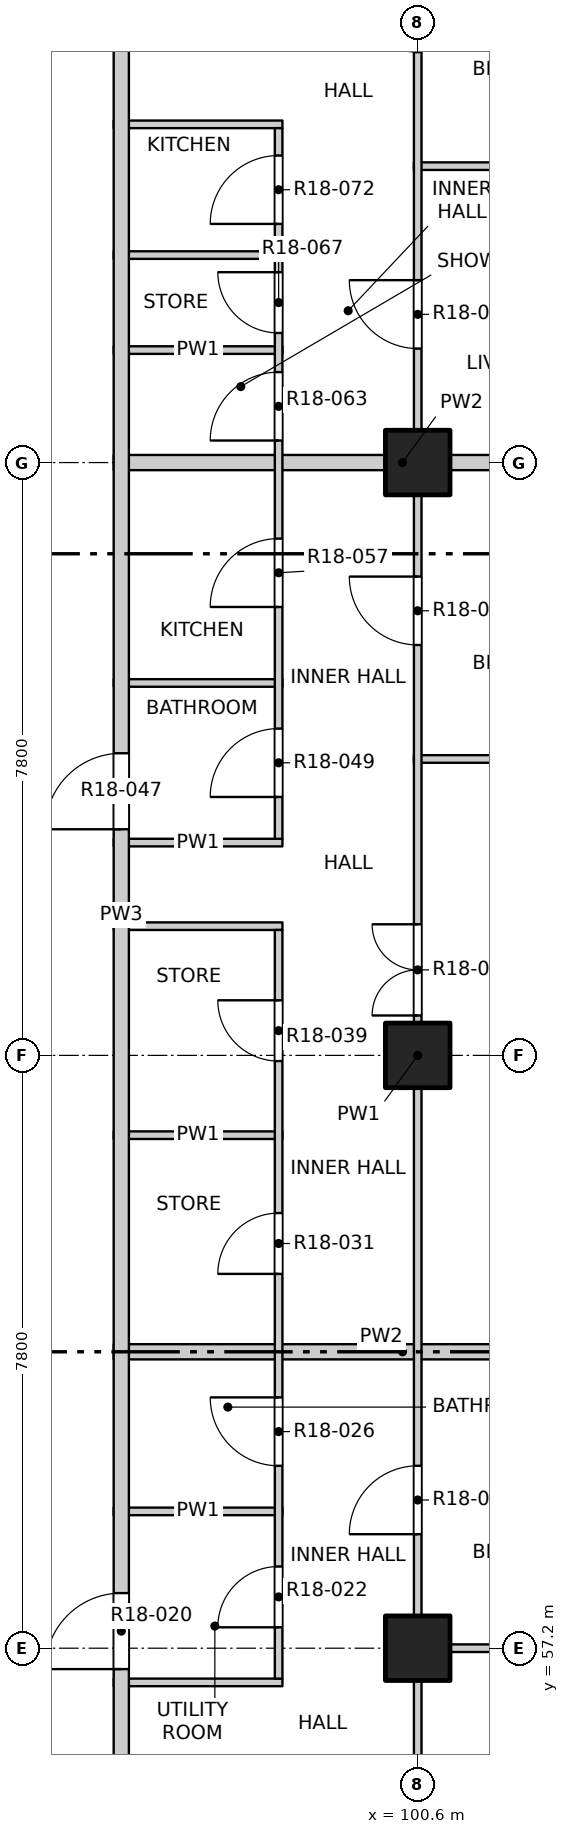
"""IFC4 building model, lengths in metres.
Left out: names, types, materials, properties, quantities, classifications, styles, units other than length and angle.
Written with IfcOpenShell. Run it as: python <this file> out.ifc"""

import sys

from ifc_helpers import new_model, si_unit, direction, frame, frame_2d, origin, origin_2d, place, context, subcontext, project, spatial, rectangle, extrude, element, fill, save


model = new_model("IFC4")
c1 = context("Model", 3, precision=1e-05, world=origin(), true_north=direction((0.0, 1.0)))
c2 = subcontext(c1, "Body", "Model", "MODEL_VIEW")
j1 = project(units=[si_unit("LENGTHUNIT", "METRE"), si_unit("PLANEANGLEUNIT", "RADIAN")], contexts=[c1])
p1 = place(None, origin())
s1 = spatial("IfcSite", under=j1, at=p1, CompositionType="ELEMENT")
p2 = place(p1, origin())
s2 = spatial("IfcBuilding", under=s1, at=p2, CompositionType="ELEMENT")
p3 = place(p2, frame((0.0, 0.0, 189.4)))
s3 = spatial("IfcBuildingStorey", under=s2, at=p3, CompositionType="ELEMENT", Elevation=189.4)
for number, where, z_axis, x_axis in (
    (1, (100.6, 57.2, -0.25), (0.0, 0.0, 1.0), (1.0, 0.0, 0.0)),
    (2, (100.6, 65.0, -0.25), (0.0, 0.0, 1.0), (1.0, 0.0, 0.0)),
    (3, (100.6, 72.8, -0.25), (0.0, 0.0, 1.0), (1.0, 0.0, 0.0)),
):
    element("IfcColumn", number, at=place(p3, frame(where, z_axis=z_axis, x_axis=x_axis)), inside=s3, PredefinedType="COLUMN", context=c2, shape_type="SweptSolid", body=[
        extrude(rectangle(XDim=0.85, YDim=0.85, at=origin_2d()), origin(), (0.0, 0.0, 1.0), 3.35),
    ])
p4 = place(p3, frame((96.6, 56.75, 0.0), z_axis=(0.0, 0.0, 1.0), x_axis=(1.0, 0.0, 0.0)))
e4 = element("IfcWall", 4, at=p4, inside=s3, PredefinedType="PARTITIONING", context=c2, shape_type="SweptSolid", body=[
    extrude(rectangle(XDim=2.22, YDim=0.1, at=frame_2d((1.11, 0.0))), origin(), (0.0, 0.0, 1.0), 3.1),
])
p5 = place(p3, frame((100.55, 57.2, 0.0), z_axis=(0.0, 0.0, 1.0), x_axis=(1.0, 0.0, 0.0)))
e5 = element("IfcWall", 5, at=p5, inside=s3, PredefinedType="PARTITIONING", context=c2, shape_type="SweptSolid", body=[
    extrude(rectangle(XDim=3.65, YDim=0.1, at=frame_2d((1.825, 0.0))), origin(), (0.0, 0.0, 1.0), 3.1),
])
p6 = place(p3, frame((96.6, 59.0, 0.0), z_axis=(0.0, 0.0, 1.0), x_axis=(1.0, 0.0, 0.0)))
e6 = element("IfcWall", 6, at=p6, inside=s3, PredefinedType="PARTITIONING", context=c2, shape_type="SweptSolid", body=[
    extrude(rectangle(XDim=2.22, YDim=0.1, at=frame_2d((1.11, 0.0))), origin(), (0.0, 0.0, 1.0), 3.1),
])
p7 = place(p3, frame((96.6, 61.1, 0.0), z_axis=(0.0, 0.0, 1.0), x_axis=(1.0, 0.0, 0.0)))
e7 = element("IfcWall", 7, at=p7, inside=s3, PredefinedType="PARTITIONING", context=c2, shape_type="SweptSolid", body=[
    extrude(rectangle(XDim=7.6, YDim=0.2, at=frame_2d((3.8, 0.0))), origin(), (0.0, 0.0, 1.0), 3.1),
])
for number, where, z_axis, x_axis in (
    (8, (96.6, 63.95, 0.0), (0.0, 0.0, 1.0), (1.0, 0.0, 0.0)),
    (9, (96.6, 66.7, 0.0), (0.0, 0.0, 1.0), (1.0, 0.0, 0.0)),
    (10, (96.6, 67.8, 0.0), (0.0, 0.0, 1.0), (1.0, 0.0, 0.0)),
):
    element("IfcWall", number, at=place(p3, frame(where, z_axis=z_axis, x_axis=x_axis)), inside=s3, PredefinedType="PARTITIONING", context=c2, shape_type="SweptSolid", body=[
        extrude(rectangle(XDim=2.22, YDim=0.1, at=frame_2d((1.11, 0.0))), origin(), (0.0, 0.0, 1.0), 3.1),
    ])
p8 = place(p3, frame((100.55, 68.9, 0.0), z_axis=(0.0, 0.0, 1.0), x_axis=(1.0, 0.0, 0.0)))
e11 = element("IfcWall", 11, at=p8, inside=s3, PredefinedType="PARTITIONING", context=c2, shape_type="SweptSolid", body=[
    extrude(rectangle(XDim=3.65, YDim=0.1, at=frame_2d((1.825, 0.0))), origin(), (0.0, 0.0, 1.0), 3.1),
])
p9 = place(p3, frame((96.6, 69.9, 0.0), z_axis=(0.0, 0.0, 1.0), x_axis=(1.0, 0.0, 0.0)))
e12 = element("IfcWall", 12, at=p9, inside=s3, PredefinedType="PARTITIONING", context=c2, shape_type="SweptSolid", body=[
    extrude(rectangle(XDim=2.22, YDim=0.1, at=frame_2d((1.11, 0.0))), origin(), (0.0, 0.0, 1.0), 3.1),
])
p10 = place(p3, frame((96.6, 72.8, 0.0), z_axis=(0.0, 0.0, 1.0), x_axis=(1.0, 0.0, 0.0)))
e13 = element("IfcWall", 13, at=p10, inside=s3, PredefinedType="PARTITIONING", context=c2, shape_type="SweptSolid", body=[
    extrude(rectangle(XDim=7.6, YDim=0.2, at=frame_2d((3.8, 0.0))), origin(), (0.0, 0.0, 1.0), 3.1),
])
for number, where, z_axis, x_axis in (
    (14, (96.6, 74.28, 0.0), (0.0, 0.0, 1.0), (1.0, 0.0, 0.0)),
    (15, (96.6, 75.53, 0.0), (0.0, 0.0, 1.0), (1.0, 0.0, 0.0)),
):
    element("IfcWall", number, at=place(p3, frame(where, z_axis=z_axis, x_axis=x_axis)), inside=s3, PredefinedType="PARTITIONING", context=c2, shape_type="SweptSolid", body=[
        extrude(rectangle(XDim=2.22, YDim=0.1, at=frame_2d((1.11, 0.0))), origin(), (0.0, 0.0, 1.0), 3.1),
    ])
p11 = place(p3, frame((100.55, 76.7, 0.0), z_axis=(0.0, 0.0, 1.0), x_axis=(1.0, 0.0, 0.0)))
e16 = element("IfcWall", 16, at=p11, inside=s3, PredefinedType="PARTITIONING", context=c2, shape_type="SweptSolid", body=[
    extrude(rectangle(XDim=3.65, YDim=0.1, at=frame_2d((1.825, 0.0))), origin(), (0.0, 0.0, 1.0), 3.1),
])
p12 = place(p3, frame((96.6, 77.25, 0.0), z_axis=(0.0, 0.0, 1.0), x_axis=(1.0, 0.0, 0.0)))
e17 = element("IfcWall", 17, at=p12, inside=s3, PredefinedType="PARTITIONING", context=c2, shape_type="SweptSolid", body=[
    extrude(rectangle(XDim=2.22, YDim=0.1, at=frame_2d((1.11, 0.0))), origin(), (0.0, 0.0, 1.0), 3.1),
])
p13 = place(p3, frame((96.7, 49.5, 0.0), z_axis=(0.0, 0.0, 1.0), x_axis=(0.0, 1.0, 0.0)))
e18 = element("IfcWall", 18, at=p13, inside=s3, PredefinedType="PARTITIONING", context=c2, shape_type="SweptSolid", body=[
    extrude(rectangle(XDim=34.7, YDim=0.2, at=frame_2d((17.35, 0.0))), origin(), (0.0, 0.0, 1.0), 3.1),
])
p14 = place(p13, frame((7.425, 0.0, 0.0)))
e19 = element("IfcOpeningElement", 19, at=p14, cuts=e18, PredefinedType="OPENING", context=c2, shape_type="SweptSolid", body=[
    extrude(rectangle(XDim=1.0, YDim=2.1, at=frame_2d((0.5, 1.05))), frame((0.0, 0.11, 0.0), z_axis=(0.0, -1.0, 0.0), x_axis=(1.0, 0.0, 0.0)), (0.0, 0.0, 1.0), 0.22),
])
p15 = place(p13, frame((18.475, 0.0, 0.0)))
e20 = element("IfcOpeningElement", 20, at=p15, cuts=e18, PredefinedType="OPENING", context=c2, shape_type="SweptSolid", body=[
    extrude(rectangle(XDim=1.0, YDim=2.1, at=frame_2d((0.5, 1.05))), frame((0.0, 0.11, 0.0), z_axis=(0.0, -1.0, 0.0), x_axis=(1.0, 0.0, 0.0)), (0.0, 0.0, 1.0), 0.22),
])
p16 = place(p13, frame((29.025, 0.0, 0.0)))
e21 = element("IfcOpeningElement", 21, at=p16, cuts=e18, PredefinedType="OPENING", context=c2, shape_type="SweptSolid", body=[
    extrude(rectangle(XDim=1.0, YDim=2.1, at=frame_2d((0.5, 1.05))), frame((0.0, 0.11, 0.0), z_axis=(0.0, -1.0, 0.0), x_axis=(1.0, 0.0, 0.0)), (0.0, 0.0, 1.0), 0.22),
])
p17 = place(p3, frame((98.77, 56.8, 0.0), z_axis=(0.0, 0.0, 1.0), x_axis=(0.0, 1.0, 0.0)))
e22 = element("IfcWall", 22, at=p17, inside=s3, PredefinedType="PARTITIONING", context=c2, shape_type="SweptSolid", body=[
    extrude(rectangle(XDim=9.85, YDim=0.1, at=frame_2d((4.925, 0.0))), origin(), (0.0, 0.0, 1.0), 3.1),
])
p18 = place(p17, frame((0.675, 0.0, 0.0)))
e23 = element("IfcOpeningElement", 23, at=p18, cuts=e22, PredefinedType="OPENING", context=c2, shape_type="SweptSolid", body=[
    extrude(rectangle(XDim=0.8, YDim=2.1, at=frame_2d((0.4, 1.05))), frame((0.0, 0.06, 0.0), z_axis=(0.0, -1.0, 0.0), x_axis=(1.0, 0.0, 0.0)), (0.0, 0.0, 1.0), 0.12),
])
p19 = place(p17, frame((2.8, 0.0, 0.0)))
e24 = element("IfcOpeningElement", 24, at=p19, cuts=e22, PredefinedType="OPENING", context=c2, shape_type="SweptSolid", body=[
    extrude(rectangle(XDim=0.9, YDim=2.1, at=frame_2d((0.45, 1.05))), frame((0.0, 0.06, 0.0), z_axis=(0.0, -1.0, 0.0), x_axis=(1.0, 0.0, 0.0)), (0.0, 0.0, 1.0), 0.12),
])
p20 = place(p17, frame((5.325, 0.0, 0.0)))
e25 = element("IfcOpeningElement", 25, at=p20, cuts=e22, PredefinedType="OPENING", context=c2, shape_type="SweptSolid", body=[
    extrude(rectangle(XDim=0.8, YDim=2.1, at=frame_2d((0.4, 1.05))), frame((0.0, 0.06, 0.0), z_axis=(0.0, -1.0, 0.0), x_axis=(1.0, 0.0, 0.0)), (0.0, 0.0, 1.0), 0.12),
])
p21 = place(p17, frame((8.125, 0.0, 0.0)))
e26 = element("IfcOpeningElement", 26, at=p21, cuts=e22, PredefinedType="OPENING", context=c2, shape_type="SweptSolid", body=[
    extrude(rectangle(XDim=0.8, YDim=2.1, at=frame_2d((0.4, 1.05))), frame((0.0, 0.06, 0.0), z_axis=(0.0, -1.0, 0.0), x_axis=(1.0, 0.0, 0.0)), (0.0, 0.0, 1.0), 0.12),
])
p22 = place(p3, frame((98.77, 67.85, 0.0), z_axis=(0.0, 0.0, 1.0), x_axis=(0.0, 1.0, 0.0)))
e27 = element("IfcWall", 27, at=p22, inside=s3, PredefinedType="PARTITIONING", context=c2, shape_type="SweptSolid", body=[
    extrude(rectangle(XDim=9.35, YDim=0.1, at=frame_2d((4.675, 0.0))), origin(), (0.0, 0.0, 1.0), 3.1),
])
p23 = place(p22, frame((0.55, 0.0, 0.0)))
e28 = element("IfcOpeningElement", 28, at=p23, cuts=e27, PredefinedType="OPENING", context=c2, shape_type="SweptSolid", body=[
    extrude(rectangle(XDim=0.9, YDim=2.1, at=frame_2d((0.45, 1.05))), frame((0.0, 0.06, 0.0), z_axis=(0.0, -1.0, 0.0), x_axis=(1.0, 0.0, 0.0)), (0.0, 0.0, 1.0), 0.12),
])
p24 = place(p22, frame((3.05, 0.0, 0.0)))
e29 = element("IfcOpeningElement", 29, at=p24, cuts=e27, PredefinedType="OPENING", context=c2, shape_type="SweptSolid", body=[
    extrude(rectangle(XDim=0.9, YDim=2.1, at=frame_2d((0.45, 1.05))), frame((0.0, 0.06, 0.0), z_axis=(0.0, -1.0, 0.0), x_axis=(1.0, 0.0, 0.0)), (0.0, 0.0, 1.0), 0.12),
])
p25 = place(p22, frame((5.24, 0.0, 0.0)))
e30 = element("IfcOpeningElement", 30, at=p25, cuts=e27, PredefinedType="OPENING", context=c2, shape_type="SweptSolid", body=[
    extrude(rectangle(XDim=0.9, YDim=2.1, at=frame_2d((0.45, 1.05))), frame((0.0, 0.06, 0.0), z_axis=(0.0, -1.0, 0.0), x_axis=(1.0, 0.0, 0.0)), (0.0, 0.0, 1.0), 0.12),
])
p26 = place(p22, frame((6.655, 0.0, 0.0)))
e31 = element("IfcOpeningElement", 31, at=p26, cuts=e27, PredefinedType="OPENING", context=c2, shape_type="SweptSolid", body=[
    extrude(rectangle(XDim=0.8, YDim=2.1, at=frame_2d((0.4, 1.05))), frame((0.0, 0.06, 0.0), z_axis=(0.0, -1.0, 0.0), x_axis=(1.0, 0.0, 0.0)), (0.0, 0.0, 1.0), 0.12),
])
p27 = place(p22, frame((8.09, 0.0, 0.0)))
e32 = element("IfcOpeningElement", 32, at=p27, cuts=e27, PredefinedType="OPENING", context=c2, shape_type="SweptSolid", body=[
    extrude(rectangle(XDim=0.9, YDim=2.1, at=frame_2d((0.45, 1.05))), frame((0.0, 0.06, 0.0), z_axis=(0.0, -1.0, 0.0), x_axis=(1.0, 0.0, 0.0)), (0.0, 0.0, 1.0), 0.12),
])
p28 = place(p3, frame((100.6, 45.8, 0.0), z_axis=(0.0, 0.0, 1.0), x_axis=(0.0, 1.0, 0.0)))
e33 = element("IfcWall", 33, at=p28, inside=s3, PredefinedType="PARTITIONING", context=c2, shape_type="SweptSolid", body=[
    extrude(rectangle(XDim=38.4, YDim=0.1, at=frame_2d((19.2, 0.0))), origin(), (0.0, 0.0, 1.0), 3.1),
])
p29 = place(p28, frame((1.05, 0.0, 0.0)))
e34 = element("IfcOpeningElement", 34, at=p29, cuts=e33, PredefinedType="OPENING", context=c2, shape_type="SweptSolid", body=[
    extrude(rectangle(XDim=1.2, YDim=2.1, at=frame_2d((0.6, 1.05))), frame((0.0, 0.06, 0.0), z_axis=(0.0, -1.0, 0.0), x_axis=(1.0, 0.0, 0.0)), (0.0, 0.0, 1.0), 0.12),
])
p30 = place(p28, frame((5.1, 0.0, 0.0)))
e35 = element("IfcOpeningElement", 35, at=p30, cuts=e33, PredefinedType="OPENING", context=c2, shape_type="SweptSolid", body=[
    extrude(rectangle(XDim=0.9, YDim=2.1, at=frame_2d((0.45, 1.05))), frame((0.0, 0.06, 0.0), z_axis=(0.0, -1.0, 0.0), x_axis=(1.0, 0.0, 0.0)), (0.0, 0.0, 1.0), 0.12),
])
p31 = place(p28, frame((9.0, 0.0, 0.0)))
e36 = element("IfcOpeningElement", 36, at=p31, cuts=e33, PredefinedType="OPENING", context=c2, shape_type="SweptSolid", body=[
    extrude(rectangle(XDim=0.9, YDim=2.1, at=frame_2d((0.45, 1.05))), frame((0.0, 0.06, 0.0), z_axis=(0.0, -1.0, 0.0), x_axis=(1.0, 0.0, 0.0)), (0.0, 0.0, 1.0), 0.12),
])
p32 = place(p28, frame((12.9, 0.0, 0.0)))
e37 = element("IfcOpeningElement", 37, at=p32, cuts=e33, PredefinedType="OPENING", context=c2, shape_type="SweptSolid", body=[
    extrude(rectangle(XDim=0.9, YDim=2.1, at=frame_2d((0.45, 1.05))), frame((0.0, 0.06, 0.0), z_axis=(0.0, -1.0, 0.0), x_axis=(1.0, 0.0, 0.0)), (0.0, 0.0, 1.0), 0.12),
])
p33 = place(p28, frame((19.725, 0.0, 0.0)))
e38 = element("IfcOpeningElement", 38, at=p33, cuts=e33, PredefinedType="OPENING", context=c2, shape_type="SweptSolid", body=[
    extrude(rectangle(XDim=1.2, YDim=2.1, at=frame_2d((0.6, 1.05))), frame((0.0, 0.06, 0.0), z_axis=(0.0, -1.0, 0.0), x_axis=(1.0, 0.0, 0.0)), (0.0, 0.0, 1.0), 0.12),
])
p34 = place(p28, frame((24.6, 0.0, 0.0)))
e39 = element("IfcOpeningElement", 39, at=p34, cuts=e33, PredefinedType="OPENING", context=c2, shape_type="SweptSolid", body=[
    extrude(rectangle(XDim=0.9, YDim=2.1, at=frame_2d((0.45, 1.05))), frame((0.0, 0.06, 0.0), z_axis=(0.0, -1.0, 0.0), x_axis=(1.0, 0.0, 0.0)), (0.0, 0.0, 1.0), 0.12),
])
p35 = place(p28, frame((28.5, 0.0, 0.0)))
e40 = element("IfcOpeningElement", 40, at=p35, cuts=e33, PredefinedType="OPENING", context=c2, shape_type="SweptSolid", body=[
    extrude(rectangle(XDim=0.9, YDim=2.1, at=frame_2d((0.45, 1.05))), frame((0.0, 0.06, 0.0), z_axis=(0.0, -1.0, 0.0), x_axis=(1.0, 0.0, 0.0)), (0.0, 0.0, 1.0), 0.12),
])
p36 = place(p28, frame((32.4, 0.0, 0.0)))
e41 = element("IfcOpeningElement", 41, at=p36, cuts=e33, PredefinedType="OPENING", context=c2, shape_type="SweptSolid", body=[
    extrude(rectangle(XDim=0.9, YDim=2.1, at=frame_2d((0.45, 1.05))), frame((0.0, 0.06, 0.0), z_axis=(0.0, -1.0, 0.0), x_axis=(1.0, 0.0, 0.0)), (0.0, 0.0, 1.0), 0.12),
])
p37 = place(p28, frame((36.15, 0.0, 0.0)))
e42 = element("IfcOpeningElement", 42, at=p37, cuts=e33, PredefinedType="OPENING", context=c2, shape_type="SweptSolid", body=[
    extrude(rectangle(XDim=1.2, YDim=2.1, at=frame_2d((0.6, 1.05))), frame((0.0, 0.06, 0.0), z_axis=(0.0, -1.0, 0.0), x_axis=(1.0, 0.0, 0.0)), (0.0, 0.0, 1.0), 0.12),
])
p38 = place(p14, origin())
e43 = element("IfcDoor", 43, at=p38, inside=s3, OperationType="SINGLE_SWING_LEFT", PredefinedType="DOOR", context=c2, shape_type="SweptSolid", body=[
    extrude(rectangle(XDim=1.0, YDim=2.1, at=frame_2d((0.5, 1.05))), frame((0.0, 0.025, 0.0), z_axis=(0.0, -1.0, 0.0), x_axis=(1.0, 0.0, 0.0)), (0.0, 0.0, 1.0), 0.05),
])
fill(e19, e43)
p39 = place(p18, origin())
e44 = element("IfcDoor", 44, at=p39, inside=s3, OperationType="SINGLE_SWING_LEFT", PredefinedType="DOOR", context=c2, shape_type="SweptSolid", body=[
    extrude(rectangle(XDim=0.8, YDim=2.1, at=frame_2d((0.4, 1.05))), frame((0.0, 0.025, 0.0), z_axis=(0.0, -1.0, 0.0), x_axis=(1.0, 0.0, 0.0)), (0.0, 0.0, 1.0), 0.05),
])
fill(e23, e44)
p40 = place(p32, origin())
e45 = element("IfcDoor", 45, at=p40, inside=s3, OperationType="SINGLE_SWING_LEFT", PredefinedType="DOOR", context=c2, shape_type="SweptSolid", body=[
    extrude(rectangle(XDim=0.9, YDim=2.1, at=frame_2d((0.45, 1.05))), frame((0.0, 0.025, 0.0), z_axis=(0.0, -1.0, 0.0), x_axis=(1.0, 0.0, 0.0)), (0.0, 0.0, 1.0), 0.05),
])
fill(e37, e45)
p41 = place(p19, origin())
e46 = element("IfcDoor", 46, at=p41, inside=s3, OperationType="SINGLE_SWING_RIGHT", PredefinedType="DOOR", context=c2, shape_type="SweptSolid", body=[
    extrude(rectangle(XDim=0.9, YDim=2.1, at=frame_2d((0.45, 1.05))), frame((0.0, 0.025, 0.0), z_axis=(0.0, -1.0, 0.0), x_axis=(1.0, 0.0, 0.0)), (0.0, 0.0, 1.0), 0.05),
])
fill(e24, e46)
p42 = place(p20, origin())
e47 = element("IfcDoor", 47, at=p42, inside=s3, OperationType="SINGLE_SWING_LEFT", PredefinedType="DOOR", context=c2, shape_type="SweptSolid", body=[
    extrude(rectangle(XDim=0.8, YDim=2.1, at=frame_2d((0.4, 1.05))), frame((0.0, 0.025, 0.0), z_axis=(0.0, -1.0, 0.0), x_axis=(1.0, 0.0, 0.0)), (0.0, 0.0, 1.0), 0.05),
])
fill(e25, e47)
p43 = place(p21, origin())
e48 = element("IfcDoor", 48, at=p43, inside=s3, OperationType="SINGLE_SWING_RIGHT", PredefinedType="DOOR", context=c2, shape_type="SweptSolid", body=[
    extrude(rectangle(XDim=0.8, YDim=2.1, at=frame_2d((0.4, 1.05))), frame((0.0, 0.025, 0.0), z_axis=(0.0, -1.0, 0.0), x_axis=(1.0, 0.0, 0.0)), (0.0, 0.0, 1.0), 0.05),
])
fill(e26, e48)
p44 = place(p33, origin())
e49 = element("IfcDoor", 49, at=p44, inside=s3, OperationType="DOUBLE_DOOR_SINGLE_SWING", PredefinedType="DOOR", context=c2, shape_type="SweptSolid", body=[
    extrude(rectangle(XDim=1.2, YDim=2.1, at=frame_2d((0.6, 1.05))), frame((0.0, 0.025, 0.0), z_axis=(0.0, -1.0, 0.0), x_axis=(1.0, 0.0, 0.0)), (0.0, 0.0, 1.0), 0.05),
])
fill(e38, e49)
p45 = place(p15, origin())
e50 = element("IfcDoor", 50, at=p45, inside=s3, OperationType="SINGLE_SWING_LEFT", PredefinedType="DOOR", context=c2, shape_type="SweptSolid", body=[
    extrude(rectangle(XDim=1.0, YDim=2.1, at=frame_2d((0.5, 1.05))), frame((0.0, 0.025, 0.0), z_axis=(0.0, -1.0, 0.0), x_axis=(1.0, 0.0, 0.0)), (0.0, 0.0, 1.0), 0.05),
])
fill(e20, e50)
p46 = place(p23, origin())
e51 = element("IfcDoor", 51, at=p46, inside=s3, OperationType="SINGLE_SWING_LEFT", PredefinedType="DOOR", context=c2, shape_type="SweptSolid", body=[
    extrude(rectangle(XDim=0.9, YDim=2.1, at=frame_2d((0.45, 1.05))), frame((0.0, 0.025, 0.0), z_axis=(0.0, -1.0, 0.0), x_axis=(1.0, 0.0, 0.0)), (0.0, 0.0, 1.0), 0.05),
])
fill(e28, e51)
p47 = place(p34, origin())
e52 = element("IfcDoor", 52, at=p47, inside=s3, OperationType="SINGLE_SWING_RIGHT", PredefinedType="DOOR", context=c2, shape_type="SweptSolid", body=[
    extrude(rectangle(XDim=0.9, YDim=2.1, at=frame_2d((0.45, 1.05))), frame((0.0, 0.025, 0.0), z_axis=(0.0, -1.0, 0.0), x_axis=(1.0, 0.0, 0.0)), (0.0, 0.0, 1.0), 0.05),
])
fill(e39, e52)
p48 = place(p24, origin())
e53 = element("IfcDoor", 53, at=p48, inside=s3, OperationType="SINGLE_SWING_LEFT", PredefinedType="DOOR", context=c2, shape_type="SweptSolid", body=[
    extrude(rectangle(XDim=0.9, YDim=2.1, at=frame_2d((0.45, 1.05))), frame((0.0, 0.025, 0.0), z_axis=(0.0, -1.0, 0.0), x_axis=(1.0, 0.0, 0.0)), (0.0, 0.0, 1.0), 0.05),
])
fill(e29, e53)
p49 = place(p25, origin())
e54 = element("IfcDoor", 54, at=p49, inside=s3, OperationType="SINGLE_SWING_LEFT", PredefinedType="DOOR", context=c2, shape_type="SweptSolid", body=[
    extrude(rectangle(XDim=0.9, YDim=2.1, at=frame_2d((0.45, 1.05))), frame((0.0, 0.025, 0.0), z_axis=(0.0, -1.0, 0.0), x_axis=(1.0, 0.0, 0.0)), (0.0, 0.0, 1.0), 0.05),
])
fill(e30, e54)
p50 = place(p35, origin())
e55 = element("IfcDoor", 55, at=p50, inside=s3, OperationType="SINGLE_SWING_RIGHT", PredefinedType="DOOR", context=c2, shape_type="SweptSolid", body=[
    extrude(rectangle(XDim=0.9, YDim=2.1, at=frame_2d((0.45, 1.05))), frame((0.0, 0.025, 0.0), z_axis=(0.0, -1.0, 0.0), x_axis=(1.0, 0.0, 0.0)), (0.0, 0.0, 1.0), 0.05),
])
fill(e40, e55)
p51 = place(p26, origin())
e56 = element("IfcDoor", 56, at=p51, inside=s3, OperationType="SINGLE_SWING_RIGHT", PredefinedType="DOOR", context=c2, shape_type="SweptSolid", body=[
    extrude(rectangle(XDim=0.8, YDim=2.1, at=frame_2d((0.4, 1.05))), frame((0.0, 0.025, 0.0), z_axis=(0.0, -1.0, 0.0), x_axis=(1.0, 0.0, 0.0)), (0.0, 0.0, 1.0), 0.05),
])
fill(e31, e56)
p52 = place(p27, origin())
e57 = element("IfcDoor", 57, at=p52, inside=s3, OperationType="SINGLE_SWING_LEFT", PredefinedType="DOOR", context=c2, shape_type="SweptSolid", body=[
    extrude(rectangle(XDim=0.9, YDim=2.1, at=frame_2d((0.45, 1.05))), frame((0.0, 0.025, 0.0), z_axis=(0.0, -1.0, 0.0), x_axis=(1.0, 0.0, 0.0)), (0.0, 0.0, 1.0), 0.05),
])
fill(e32, e57)
p53 = place(p36, origin())
e58 = element("IfcDoor", 58, at=p53, inside=s3, OperationType="SINGLE_SWING_RIGHT", PredefinedType="DOOR", context=c2, shape_type="SweptSolid", body=[
    extrude(rectangle(XDim=0.9, YDim=2.1, at=frame_2d((0.45, 1.05))), frame((0.0, 0.025, 0.0), z_axis=(0.0, -1.0, 0.0), x_axis=(1.0, 0.0, 0.0)), (0.0, 0.0, 1.0), 0.05),
])
fill(e41, e58)
save(model, sys.argv[1])
